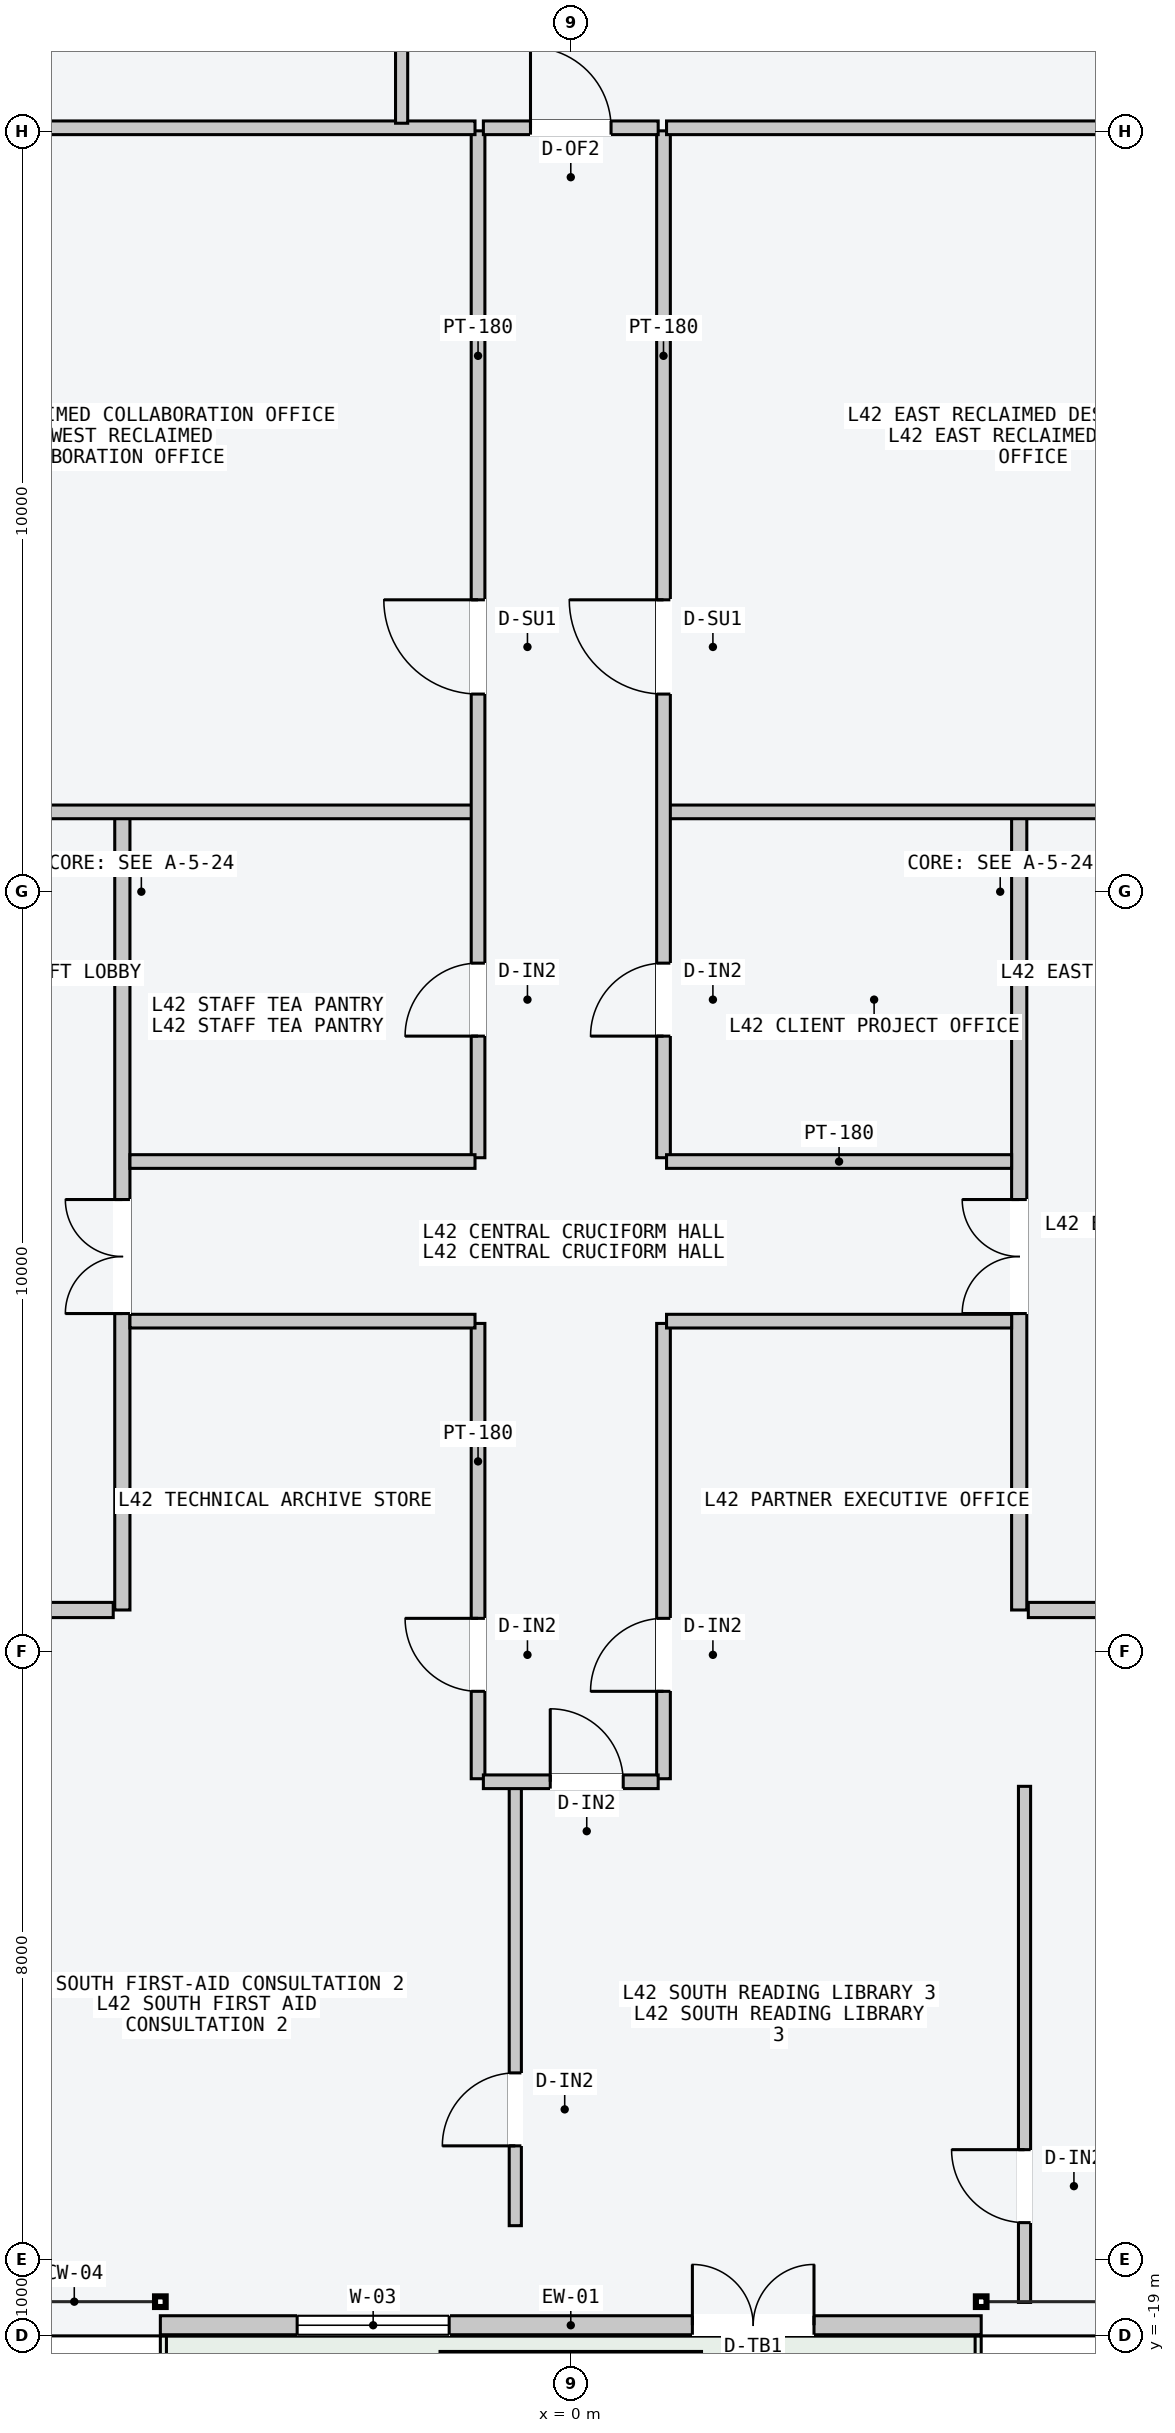
"""IFC4 building model, lengths in metres.
Left out: names, types, materials, properties, quantities, classifications, styles, units other than length and angle.
Written with IfcOpenShell. Run it as: python <this file> out.ifc"""

import sys

from ifc_helpers import new_model, si_unit, direction, frame, frame_2d, origin, place, context, subcontext, project, spatial, rectangle, extrude, element, fill, save


model = new_model("IFC4")
c1 = context("Model", 3, precision=1e-05, world=origin(), true_north=direction((0.0, 1.0)))
c2 = subcontext(c1, "Body", "Model", "MODEL_VIEW")
j1 = project(units=[si_unit("LENGTHUNIT", "METRE"), si_unit("PLANEANGLEUNIT", "RADIAN")], contexts=[c1])
p1 = place(None, origin())
s1 = spatial("IfcSite", under=j1, at=p1, CompositionType="ELEMENT")
p2 = place(p1, origin())
s2 = spatial("IfcBuilding", under=s1, at=p2, CompositionType="ELEMENT")
p3 = place(p2, frame((0.0, 0.0, 162.3)))
s3 = spatial("IfcBuildingStorey", under=s2, at=p3, CompositionType="ELEMENT", Elevation=162.3)
p4 = place(p3, frame((-5.4, -18.86, 0.0), z_axis=(0.0, 0.0, 1.0), x_axis=(1.0, 0.0, 0.0)))
e1 = element("IfcWall", 1, at=p4, inside=s3, PredefinedType="STANDARD", context=c2, shape_type="SweptSolid", body=[
    extrude(rectangle(XDim=10.8, YDim=0.25, at=frame_2d((5.4, 0.0))), origin(), (0.0, 0.0, 1.0), 3.4),
])
p5 = place(p4, frame((7.0, 0.0, 0.0)))
e2 = element("IfcOpeningElement", 2, at=p5, cuts=e1, PredefinedType="OPENING", context=c2, shape_type="SweptSolid", body=[
    extrude(rectangle(XDim=1.6, YDim=2.2, at=frame_2d((0.8, 1.1))), frame((0.0, 0.135, 0.0), z_axis=(0.0, -1.0, 0.0), x_axis=(1.0, 0.0, 0.0)), (0.0, 0.0, 1.0), 0.27),
])
p6 = place(p4, frame((1.8, 0.0, 0.85)))
e3 = element("IfcOpeningElement", 3, at=p6, cuts=e1, PredefinedType="OPENING", context=c2, shape_type="SweptSolid", body=[
    extrude(rectangle(XDim=2.0, YDim=2.1, at=frame_2d((1.0, 1.05))), frame((0.0, 0.135, 0.0), z_axis=(0.0, -1.0, 0.0), x_axis=(1.0, 0.0, 0.0)), (0.0, 0.0, 1.0), 0.27),
])
p7 = place(p3, frame((-5.9, -9.45, 0.0), z_axis=(0.0, 0.0, 1.0), x_axis=(0.0, 1.0, 0.0)))
e4 = element("IfcWall", 4, at=p7, inside=s3, PredefinedType="PARTITIONING", context=c2, shape_type="SweptSolid", body=[
    extrude(rectangle(XDim=10.5, YDim=0.2, at=frame_2d((5.25, 0.0))), origin(), (0.0, 0.0, 1.0), 3.4),
])
p8 = place(p7, frame((3.9, 0.0, 0.0)))
e5 = element("IfcOpeningElement", 5, at=p8, cuts=e4, PredefinedType="OPENING", context=c2, shape_type="SweptSolid", body=[
    extrude(rectangle(XDim=1.5, YDim=2.2, at=frame_2d((0.75, 1.1))), frame((0.0, 0.11, 0.0), z_axis=(0.0, -1.0, 0.0), x_axis=(1.0, 0.0, 0.0)), (0.0, 0.0, 1.0), 0.22),
])
p9 = place(p3, frame((-6.02, -9.45, 0.0), z_axis=(0.0, 0.0, 1.0), x_axis=(-1.0, 0.0, 0.0)))
e6 = element("IfcWall", 6, at=p9, inside=s3, PredefinedType="PARTITIONING", context=c2, shape_type="SweptSolid", body=[
    extrude(rectangle(XDim=1.8, YDim=0.2, at=frame_2d((0.9, 0.0))), origin(), (0.0, 0.0, 1.0), 3.4),
])
p10 = place(p3, frame((5.9, -9.45, 0.0), z_axis=(0.0, 0.0, 1.0), x_axis=(0.0, 1.0, 0.0)))
e7 = element("IfcWall", 7, at=p10, inside=s3, PredefinedType="PARTITIONING", context=c2, shape_type="SweptSolid", body=[
    extrude(rectangle(XDim=10.5, YDim=0.2, at=frame_2d((5.25, 0.0))), origin(), (0.0, 0.0, 1.0), 3.4),
])
p11 = place(p10, frame((3.9, 0.0, 0.0)))
e8 = element("IfcOpeningElement", 8, at=p11, cuts=e7, PredefinedType="OPENING", context=c2, shape_type="SweptSolid", body=[
    extrude(rectangle(XDim=1.5, YDim=2.2, at=frame_2d((0.75, 1.1))), frame((0.0, 0.11, 0.0), z_axis=(0.0, -1.0, 0.0), x_axis=(1.0, 0.0, 0.0)), (0.0, 0.0, 1.0), 0.22),
])
p12 = place(p3, frame((6.02, -9.45, 0.0), z_axis=(0.0, 0.0, 1.0), x_axis=(1.0, 0.0, 0.0)))
e9 = element("IfcWall", 9, at=p12, inside=s3, PredefinedType="PARTITIONING", context=c2, shape_type="SweptSolid", body=[
    extrude(rectangle(XDim=1.8, YDim=0.2, at=frame_2d((0.9, 0.0))), origin(), (0.0, 0.0, 1.0), 3.4),
])
p13 = place(p3, frame((-10.05, 1.05, 0.0), z_axis=(0.0, 0.0, 1.0), x_axis=(1.0, 0.0, 0.0)))
e10 = element("IfcWall", 10, at=p13, inside=s3, PredefinedType="PARTITIONING", context=c2, shape_type="SweptSolid", body=[
    extrude(rectangle(XDim=8.79, YDim=0.18, at=frame_2d((4.395, 0.0))), origin(), (0.0, 0.0, 1.0), 3.4),
])
p14 = place(p3, frame((-1.22, -3.5, 0.0), z_axis=(0.0, 0.0, 1.0), x_axis=(0.0, 1.0, 0.0)))
e11 = element("IfcWall", 11, at=p14, inside=s3, PredefinedType="PARTITIONING", context=c2, shape_type="SweptSolid", body=[
    extrude(rectangle(XDim=13.51, YDim=0.18, at=frame_2d((6.755, 0.0))), origin(), (0.0, 0.0, 1.0), 3.4),
])
p15 = place(p14, frame((6.1, 0.0, 0.0)))
e12 = element("IfcOpeningElement", 12, at=p15, cuts=e11, PredefinedType="OPENING", context=c2, shape_type="SweptSolid", body=[
    extrude(rectangle(XDim=1.24, YDim=2.24, at=frame_2d((0.62, 1.12))), frame((0.0, 0.1, 0.0), z_axis=(0.0, -1.0, 0.0), x_axis=(1.0, 0.0, 0.0)), (0.0, 0.0, 1.0), 0.2),
])
p16 = place(p14, frame((1.6, 0.0, 0.0)))
e13 = element("IfcOpeningElement", 13, at=p16, cuts=e11, PredefinedType="OPENING", context=c2, shape_type="SweptSolid", body=[
    extrude(rectangle(XDim=0.96, YDim=2.18, at=frame_2d((0.48, 1.09))), frame((0.0, 0.1, 0.0), z_axis=(0.0, -1.0, 0.0), x_axis=(1.0, 0.0, 0.0)), (0.0, 0.0, 1.0), 0.2),
])
p17 = place(p3, frame((-7.5, 10.05, 0.0), z_axis=(0.0, 0.0, 1.0), x_axis=(1.0, 0.0, 0.0)))
e14 = element("IfcWall", 14, at=p17, inside=s3, PredefinedType="PARTITIONING", context=c2, shape_type="SweptSolid", body=[
    extrude(rectangle(XDim=6.24, YDim=0.18, at=frame_2d((3.12, 0.0))), origin(), (0.0, 0.0, 1.0), 3.4),
])
p18 = place(p3, frame((-5.8, -3.55, 0.0), z_axis=(0.0, 0.0, 1.0), x_axis=(1.0, 0.0, 0.0)))
e15 = element("IfcWall", 15, at=p18, inside=s3, PredefinedType="PARTITIONING", context=c2, shape_type="SweptSolid", body=[
    extrude(rectangle(XDim=4.54, YDim=0.18, at=frame_2d((2.27, 0.0))), origin(), (0.0, 0.0, 1.0), 3.4),
])
p19 = place(p3, frame((1.26, 1.05, 0.0), z_axis=(0.0, 0.0, 1.0), x_axis=(1.0, 0.0, 0.0)))
e16 = element("IfcWall", 16, at=p19, inside=s3, PredefinedType="PARTITIONING", context=c2, shape_type="SweptSolid", body=[
    extrude(rectangle(XDim=8.8, YDim=0.18, at=frame_2d((4.4, 0.0))), origin(), (0.0, 0.0, 1.0), 3.4),
])
p20 = place(p3, frame((1.22, -3.5, 0.0), z_axis=(0.0, 0.0, 1.0), x_axis=(0.0, 1.0, 0.0)))
e17 = element("IfcWall", 17, at=p20, inside=s3, PredefinedType="PARTITIONING", context=c2, shape_type="SweptSolid", body=[
    extrude(rectangle(XDim=13.51, YDim=0.18, at=frame_2d((6.755, 0.0))), origin(), (0.0, 0.0, 1.0), 3.4),
])
p21 = place(p20, frame((6.1, 0.0, 0.0)))
e18 = element("IfcOpeningElement", 18, at=p21, cuts=e17, PredefinedType="OPENING", context=c2, shape_type="SweptSolid", body=[
    extrude(rectangle(XDim=1.24, YDim=2.24, at=frame_2d((0.62, 1.12))), frame((0.0, 0.1, 0.0), z_axis=(0.0, -1.0, 0.0), x_axis=(1.0, 0.0, 0.0)), (0.0, 0.0, 1.0), 0.2),
])
p22 = place(p20, frame((1.6, 0.0, 0.0)))
e19 = element("IfcOpeningElement", 19, at=p22, cuts=e17, PredefinedType="OPENING", context=c2, shape_type="SweptSolid", body=[
    extrude(rectangle(XDim=0.96, YDim=2.18, at=frame_2d((0.48, 1.09))), frame((0.0, 0.1, 0.0), z_axis=(0.0, -1.0, 0.0), x_axis=(1.0, 0.0, 0.0)), (0.0, 0.0, 1.0), 0.2),
])
p23 = place(p3, frame((1.26, 10.05, 0.0), z_axis=(0.0, 0.0, 1.0), x_axis=(1.0, 0.0, 0.0)))
e20 = element("IfcWall", 20, at=p23, inside=s3, PredefinedType="PARTITIONING", context=c2, shape_type="SweptSolid", body=[
    extrude(rectangle(XDim=6.24, YDim=0.18, at=frame_2d((3.12, 0.0))), origin(), (0.0, 0.0, 1.0), 3.4),
])
p24 = place(p3, frame((1.26, -3.55, 0.0), z_axis=(0.0, 0.0, 1.0), x_axis=(1.0, 0.0, 0.0)))
e21 = element("IfcWall", 21, at=p24, inside=s3, PredefinedType="PARTITIONING", context=c2, shape_type="SweptSolid", body=[
    extrude(rectangle(XDim=4.54, YDim=0.18, at=frame_2d((2.27, 0.0))), origin(), (0.0, 0.0, 1.0), 3.4),
])
p25 = place(p3, frame((-1.22, -11.67, 0.0), z_axis=(0.0, 0.0, 1.0), x_axis=(0.0, 1.0, 0.0)))
e22 = element("IfcWall", 22, at=p25, inside=s3, PredefinedType="PARTITIONING", context=c2, shape_type="SweptSolid", body=[
    extrude(rectangle(XDim=5.99, YDim=0.18, at=frame_2d((2.995, 0.0))), origin(), (0.0, 0.0, 1.0), 3.4),
])
p26 = place(p25, frame((1.15, 0.0, 0.0)))
e23 = element("IfcOpeningElement", 23, at=p26, cuts=e22, PredefinedType="OPENING", context=c2, shape_type="SweptSolid", body=[
    extrude(rectangle(XDim=0.96, YDim=2.18, at=frame_2d((0.48, 1.09))), frame((0.0, 0.1, 0.0), z_axis=(0.0, -1.0, 0.0), x_axis=(1.0, 0.0, 0.0)), (0.0, 0.0, 1.0), 0.2),
])
p27 = place(p3, frame((1.22, -11.67, 0.0), z_axis=(0.0, 0.0, 1.0), x_axis=(0.0, 1.0, 0.0)))
e24 = element("IfcWall", 24, at=p27, inside=s3, PredefinedType="PARTITIONING", context=c2, shape_type="SweptSolid", body=[
    extrude(rectangle(XDim=5.99, YDim=0.18, at=frame_2d((2.995, 0.0))), origin(), (0.0, 0.0, 1.0), 3.4),
])
p28 = place(p27, frame((1.15, 0.0, 0.0)))
e25 = element("IfcOpeningElement", 25, at=p28, cuts=e24, PredefinedType="OPENING", context=c2, shape_type="SweptSolid", body=[
    extrude(rectangle(XDim=0.96, YDim=2.18, at=frame_2d((0.48, 1.09))), frame((0.0, 0.1, 0.0), z_axis=(0.0, -1.0, 0.0), x_axis=(1.0, 0.0, 0.0)), (0.0, 0.0, 1.0), 0.2),
])
for number, where, z_axis, x_axis in (
    (26, (-5.8, -5.65, 0.0), (0.0, 0.0, 1.0), (1.0, 0.0, 0.0)),
    (27, (1.26, -5.65, 0.0), (0.0, 0.0, 1.0), (1.0, 0.0, 0.0)),
):
    element("IfcWall", number, at=place(p3, frame(where, z_axis=z_axis, x_axis=x_axis)), inside=s3, PredefinedType="PARTITIONING", context=c2, shape_type="SweptSolid", body=[
        extrude(rectangle(XDim=4.54, YDim=0.18, at=frame_2d((2.27, 0.0))), origin(), (0.0, 0.0, 1.0), 3.4),
    ])
p29 = place(p3, frame((-2.226, 10.11, 0.0), z_axis=(0.0, 0.0, 1.0), x_axis=(0.0, 1.0, 0.0)))
e28 = element("IfcWall", 28, at=p29, inside=s3, PredefinedType="PARTITIONING", context=c2, shape_type="SweptSolid", body=[
    extrude(rectangle(XDim=8.45, YDim=0.16, at=frame_2d((4.225, 0.0))), origin(), (0.0, 0.0, 1.0), 3.4),
])
p30 = place(p29, frame((1.15, 0.0, 0.0)))
e29 = element("IfcOpeningElement", 29, at=p30, cuts=e28, PredefinedType="OPENING", context=c2, shape_type="SweptSolid", body=[
    extrude(rectangle(XDim=0.96, YDim=2.18, at=frame_2d((0.48, 1.09))), frame((0.0, 0.09, 0.0), z_axis=(0.0, -1.0, 0.0), x_axis=(1.0, 0.0, 0.0)), (0.0, 0.0, 1.0), 0.18),
])
p31 = place(p3, frame((-1.15, 10.05, 0.0), z_axis=(0.0, 0.0, 1.0), x_axis=(1.0, 0.0, 0.0)))
e30 = element("IfcWall", 30, at=p31, inside=s3, PredefinedType="PARTITIONING", context=c2, shape_type="SweptSolid", body=[
    extrude(rectangle(XDim=2.3, YDim=0.18, at=frame_2d((1.15, 0.0))), origin(), (0.0, 0.0, 1.0), 3.4),
])
p32 = place(p31, frame((0.62, 0.0, 0.0)))
e31 = element("IfcOpeningElement", 31, at=p32, cuts=e30, PredefinedType="OPENING", context=c2, shape_type="SweptSolid", body=[
    extrude(rectangle(XDim=1.06, YDim=2.2, at=frame_2d((0.53, 1.1))), frame((0.0, 0.1, 0.0), z_axis=(0.0, -1.0, 0.0), x_axis=(1.0, 0.0, 0.0)), (0.0, 0.0, 1.0), 0.2),
])
p33 = place(p3, frame((-0.73, -17.55, 0.0), z_axis=(0.0, 0.0, 1.0), x_axis=(0.0, 1.0, 0.0)))
e32 = element("IfcWall", 32, at=p33, inside=s3, PredefinedType="PARTITIONING", context=c2, shape_type="SweptSolid", body=[
    extrude(rectangle(XDim=5.78, YDim=0.16, at=frame_2d((2.89, 0.0))), origin(), (0.0, 0.0, 1.0), 3.4),
])
p34 = place(p33, frame((1.05, 0.0, 0.0)))
e33 = element("IfcOpeningElement", 33, at=p34, cuts=e32, PredefinedType="OPENING", context=c2, shape_type="SweptSolid", body=[
    extrude(rectangle(XDim=0.96, YDim=2.18, at=frame_2d((0.48, 1.09))), frame((0.0, 0.09, 0.0), z_axis=(0.0, -1.0, 0.0), x_axis=(1.0, 0.0, 0.0)), (0.0, 0.0, 1.0), 0.18),
])
p35 = place(p3, frame((5.97, -18.56, 0.0), z_axis=(0.0, 0.0, 1.0), x_axis=(0.0, 1.0, 0.0)))
e34 = element("IfcWall", 34, at=p35, inside=s3, PredefinedType="PARTITIONING", context=c2, shape_type="SweptSolid", body=[
    extrude(rectangle(XDim=6.79, YDim=0.16, at=frame_2d((3.395, 0.0))), origin(), (0.0, 0.0, 1.0), 3.4),
])
p36 = place(p35, frame((1.05, 0.0, 0.0)))
e35 = element("IfcOpeningElement", 35, at=p36, cuts=e34, PredefinedType="OPENING", context=c2, shape_type="SweptSolid", body=[
    extrude(rectangle(XDim=0.96, YDim=2.18, at=frame_2d((0.48, 1.09))), frame((0.0, 0.09, 0.0), z_axis=(0.0, -1.0, 0.0), x_axis=(1.0, 0.0, 0.0)), (0.0, 0.0, 1.0), 0.18),
])
p37 = place(p3, frame((-1.15, -11.71, 0.0), z_axis=(0.0, 0.0, 1.0), x_axis=(1.0, 0.0, 0.0)))
e36 = element("IfcWall", 36, at=p37, inside=s3, PredefinedType="PARTITIONING", context=c2, shape_type="SweptSolid", body=[
    extrude(rectangle(XDim=2.3, YDim=0.18, at=frame_2d((1.15, 0.0))), origin(), (0.0, 0.0, 1.0), 3.4),
])
p38 = place(p37, frame((0.88, 0.0, 0.0)))
e37 = element("IfcOpeningElement", 37, at=p38, cuts=e36, PredefinedType="OPENING", context=c2, shape_type="SweptSolid", body=[
    extrude(rectangle(XDim=0.96, YDim=2.18, at=frame_2d((0.48, 1.09))), frame((0.0, 0.1, 0.0), z_axis=(0.0, -1.0, 0.0), x_axis=(1.0, 0.0, 0.0)), (0.0, 0.0, 1.0), 0.2),
])
p39 = place(p5, origin())
e38 = element("IfcDoor", 38, at=p39, inside=s3, OperationType="DOUBLE_DOOR_SINGLE_SWING", PredefinedType="DOOR", context=c2, shape_type="SweptSolid", body=[
    extrude(rectangle(XDim=1.6, YDim=2.2, at=frame_2d((0.8, 1.1))), frame((0.0, 0.025, 0.0), z_axis=(0.0, -1.0, 0.0), x_axis=(1.0, 0.0, 0.0)), (0.0, 0.0, 1.0), 0.05),
])
fill(e2, e38)
p40 = place(p6, origin())
e39 = element("IfcWindow", 39, at=p40, inside=s3, PartitioningType="SINGLE_PANEL", PredefinedType="WINDOW", context=c2, shape_type="SweptSolid", body=[
    extrude(rectangle(XDim=2.0, YDim=2.1, at=frame_2d((1.0, 1.05))), frame((0.0, 0.03, 0.0), z_axis=(0.0, -1.0, 0.0), x_axis=(1.0, 0.0, 0.0)), (0.0, 0.0, 1.0), 0.06),
])
fill(e3, e39)
p41 = place(p8, origin())
e40 = element("IfcDoor", 40, at=p41, inside=s3, OperationType="DOUBLE_DOOR_SINGLE_SWING", PredefinedType="DOOR", context=c2, shape_type="SweptSolid", body=[
    extrude(rectangle(XDim=1.5, YDim=2.2, at=frame_2d((0.75, 1.1))), frame((0.0, 0.025, 0.0), z_axis=(0.0, -1.0, 0.0), x_axis=(1.0, 0.0, 0.0)), (0.0, 0.0, 1.0), 0.05),
])
fill(e5, e40)
p42 = place(p11, origin())
e41 = element("IfcDoor", 41, at=p42, inside=s3, OperationType="DOUBLE_DOOR_SINGLE_SWING", PredefinedType="DOOR", context=c2, shape_type="SweptSolid", body=[
    extrude(rectangle(XDim=1.5, YDim=2.2, at=frame_2d((0.75, 1.1))), frame((0.0, 0.025, 0.0), z_axis=(0.0, -1.0, 0.0), x_axis=(1.0, 0.0, 0.0)), (0.0, 0.0, 1.0), 0.05),
])
fill(e8, e41)
p43 = place(p15, origin())
e42 = element("IfcDoor", 42, at=p43, inside=s3, OperationType="SINGLE_SWING_RIGHT", PredefinedType="DOOR", context=c2, shape_type="SweptSolid", body=[
    extrude(rectangle(XDim=1.24, YDim=2.24, at=frame_2d((0.62, 1.12))), frame((0.0, 0.025, 0.0), z_axis=(0.0, -1.0, 0.0), x_axis=(1.0, 0.0, 0.0)), (0.0, 0.0, 1.0), 0.05),
])
fill(e12, e42)
p44 = place(p16, origin())
e43 = element("IfcDoor", 43, at=p44, inside=s3, OperationType="SINGLE_SWING_LEFT", PredefinedType="DOOR", context=c2, shape_type="SweptSolid", body=[
    extrude(rectangle(XDim=0.96, YDim=2.18, at=frame_2d((0.48, 1.09))), frame((0.0, 0.025, 0.0), z_axis=(0.0, -1.0, 0.0), x_axis=(1.0, 0.0, 0.0)), (0.0, 0.0, 1.0), 0.05),
])
fill(e13, e43)
p45 = place(p21, origin())
e44 = element("IfcDoor", 44, at=p45, inside=s3, OperationType="SINGLE_SWING_RIGHT", PredefinedType="DOOR", context=c2, shape_type="SweptSolid", body=[
    extrude(rectangle(XDim=1.24, YDim=2.24, at=frame_2d((0.62, 1.12))), frame((0.0, 0.025, 0.0), z_axis=(0.0, -1.0, 0.0), x_axis=(1.0, 0.0, 0.0)), (0.0, 0.0, 1.0), 0.05),
])
fill(e18, e44)
p46 = place(p22, origin())
e45 = element("IfcDoor", 45, at=p46, inside=s3, OperationType="SINGLE_SWING_LEFT", PredefinedType="DOOR", context=c2, shape_type="SweptSolid", body=[
    extrude(rectangle(XDim=0.96, YDim=2.18, at=frame_2d((0.48, 1.09))), frame((0.0, 0.025, 0.0), z_axis=(0.0, -1.0, 0.0), x_axis=(1.0, 0.0, 0.0)), (0.0, 0.0, 1.0), 0.05),
])
fill(e19, e45)
p47 = place(p26, origin())
e46 = element("IfcDoor", 46, at=p47, inside=s3, OperationType="SINGLE_SWING_RIGHT", PredefinedType="DOOR", context=c2, shape_type="SweptSolid", body=[
    extrude(rectangle(XDim=0.96, YDim=2.18, at=frame_2d((0.48, 1.09))), frame((0.0, 0.025, 0.0), z_axis=(0.0, -1.0, 0.0), x_axis=(1.0, 0.0, 0.0)), (0.0, 0.0, 1.0), 0.05),
])
fill(e23, e46)
p48 = place(p28, origin())
e47 = element("IfcDoor", 47, at=p48, inside=s3, OperationType="SINGLE_SWING_LEFT", PredefinedType="DOOR", context=c2, shape_type="SweptSolid", body=[
    extrude(rectangle(XDim=0.96, YDim=2.18, at=frame_2d((0.48, 1.09))), frame((0.0, 0.025, 0.0), z_axis=(0.0, -1.0, 0.0), x_axis=(1.0, 0.0, 0.0)), (0.0, 0.0, 1.0), 0.05),
])
fill(e25, e47)
p49 = place(p32, origin())
e48 = element("IfcDoor", 48, at=p49, inside=s3, OperationType="SINGLE_SWING_LEFT", PredefinedType="DOOR", context=c2, shape_type="SweptSolid", body=[
    extrude(rectangle(XDim=1.06, YDim=2.2, at=frame_2d((0.53, 1.1))), frame((0.0, 0.025, 0.0), z_axis=(0.0, -1.0, 0.0), x_axis=(1.0, 0.0, 0.0)), (0.0, 0.0, 1.0), 0.05),
])
fill(e31, e48)
p50 = place(p34, origin())
e49 = element("IfcDoor", 49, at=p50, inside=s3, OperationType="SINGLE_SWING_LEFT", PredefinedType="DOOR", context=c2, shape_type="SweptSolid", body=[
    extrude(rectangle(XDim=0.96, YDim=2.18, at=frame_2d((0.48, 1.09))), frame((0.0, 0.025, 0.0), z_axis=(0.0, -1.0, 0.0), x_axis=(1.0, 0.0, 0.0)), (0.0, 0.0, 1.0), 0.05),
])
fill(e33, e49)
p51 = place(p36, origin())
e50 = element("IfcDoor", 50, at=p51, inside=s3, OperationType="SINGLE_SWING_RIGHT", PredefinedType="DOOR", context=c2, shape_type="SweptSolid", body=[
    extrude(rectangle(XDim=0.96, YDim=2.18, at=frame_2d((0.48, 1.09))), frame((0.0, 0.025, 0.0), z_axis=(0.0, -1.0, 0.0), x_axis=(1.0, 0.0, 0.0)), (0.0, 0.0, 1.0), 0.05),
])
fill(e35, e50)
p52 = place(p38, origin())
e51 = element("IfcDoor", 51, at=p52, inside=s3, OperationType="SINGLE_SWING_LEFT", PredefinedType="DOOR", context=c2, shape_type="SweptSolid", body=[
    extrude(rectangle(XDim=0.96, YDim=2.18, at=frame_2d((0.48, 1.09))), frame((0.0, 0.025, 0.0), z_axis=(0.0, -1.0, 0.0), x_axis=(1.0, 0.0, 0.0)), (0.0, 0.0, 1.0), 0.05),
])
fill(e37, e51)
save(model, sys.argv[1])
